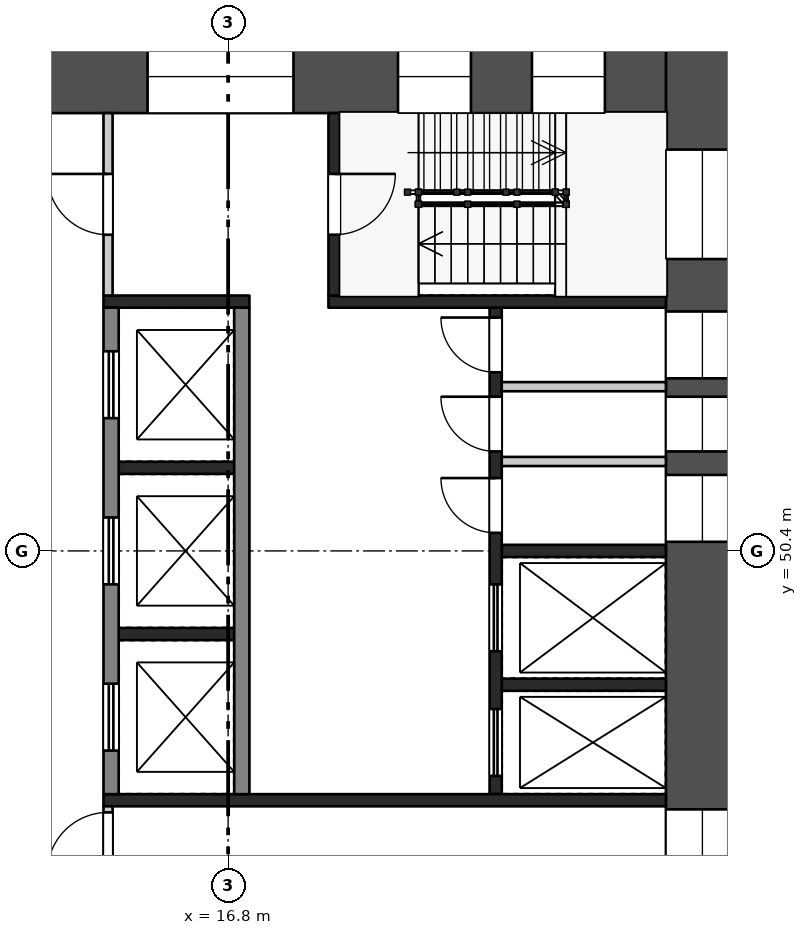
"""IFC4 building model, lengths in metres.
Left out: names, types, materials, properties, quantities, classifications, styles, units other than length and angle.
Written with IfcOpenShell. Run it as: python <this file> out.ifc"""

import sys

from ifc_helpers import new_model, si_unit, direction, frame, frame_2d, origin, place, context, subcontext, project, spatial, rectangle, extrude, element, fill, save


model = new_model("IFC4")
c1 = context("Model", 3, precision=1e-05, world=origin(), true_north=direction((0.0, 1.0)))
c2 = subcontext(c1, "Body", "Model", "MODEL_VIEW")
j1 = project(units=[si_unit("LENGTHUNIT", "METRE"), si_unit("PLANEANGLEUNIT", "RADIAN")], contexts=[c1])
p1 = place(None, origin())
s1 = spatial("IfcSite", under=j1, at=p1, CompositionType="ELEMENT")
p2 = place(p1, origin())
s2 = spatial("IfcBuilding", under=s1, at=p2, CompositionType="ELEMENT")
p3 = place(p2, frame((0.0, 0.0, 140.7)))
s3 = spatial("IfcBuildingStorey", under=s2, at=p3, CompositionType="ELEMENT", Elevation=140.7)
p4 = place(p3, frame((24.6, 58.8, 0.0), z_axis=(0.0, 0.0, 1.0), x_axis=(0.0, -1.0, 0.0)))
e1 = element("IfcWall", 1, at=p4, inside=s3, PredefinedType="SHEAR", context=c2, shape_type="SweptSolid", body=[
    extrude(rectangle(XDim=16.8, YDim=1.2, at=frame_2d((8.4, 0.0))), origin(), (0.0, 0.0, 1.0), 6.72),
])
p5 = place(p4, frame((1.8, 0.0, 0.5)))
e2 = element("IfcOpeningElement", 2, at=p5, cuts=e1, PredefinedType="OPENING", context=c2, shape_type="SweptSolid", body=[
    extrude(rectangle(XDim=1.8, YDim=2.4, at=frame_2d((0.9, 1.2))), frame((0.0, 0.61, 0.0), z_axis=(0.0, -1.0, 0.0), x_axis=(1.0, 0.0, 0.0)), (0.0, 0.0, 1.0), 1.22),
])
p6 = place(p4, frame((4.462, 0.0, 1.6)))
e3 = element("IfcOpeningElement", 3, at=p6, cuts=e1, PredefinedType="OPENING", context=c2, shape_type="SweptSolid", body=[
    extrude(rectangle(XDim=1.1, YDim=1.2, at=frame_2d((0.55, 0.6))), frame((0.0, 0.61, 0.0), z_axis=(0.0, -1.0, 0.0), x_axis=(1.0, 0.0, 0.0)), (0.0, 0.0, 1.0), 1.22),
])
p7 = place(p4, frame((5.864, 0.0, 1.6)))
e4 = element("IfcOpeningElement", 4, at=p7, cuts=e1, PredefinedType="OPENING", context=c2, shape_type="SweptSolid", body=[
    extrude(rectangle(XDim=0.9, YDim=1.2, at=frame_2d((0.45, 0.6))), frame((0.0, 0.61, 0.0), z_axis=(0.0, -1.0, 0.0), x_axis=(1.0, 0.0, 0.0)), (0.0, 0.0, 1.0), 1.22),
])
p8 = place(p4, frame((7.15, 0.0, 1.6)))
e5 = element("IfcOpeningElement", 5, at=p8, cuts=e1, PredefinedType="OPENING", context=c2, shape_type="SweptSolid", body=[
    extrude(rectangle(XDim=1.1, YDim=1.2, at=frame_2d((0.55, 0.6))), frame((0.0, 0.61, 0.0), z_axis=(0.0, -1.0, 0.0), x_axis=(1.0, 0.0, 0.0)), (0.0, 0.0, 1.0), 1.22),
])
p9 = place(p4, frame((12.65, 0.0, 0.6)))
e6 = element("IfcOpeningElement", 6, at=p9, cuts=e1, PredefinedType="OPENING", context=c2, shape_type="SweptSolid", body=[
    extrude(rectangle(XDim=1.0, YDim=2.1, at=frame_2d((0.5, 1.05))), frame((0.0, 0.61, 0.0), z_axis=(0.0, -1.0, 0.0), x_axis=(1.0, 0.0, 0.0)), (0.0, 0.0, 1.0), 1.22),
])
p10 = place(p4, frame((14.175, 0.0, 1.6)))
e7 = element("IfcOpeningElement", 7, at=p10, cuts=e1, PredefinedType="OPENING", context=c2, shape_type="SweptSolid", body=[
    extrude(rectangle(XDim=1.2, YDim=1.2, at=frame_2d((0.6, 0.6))), frame((0.0, 0.61, 0.0), z_axis=(0.0, -1.0, 0.0), x_axis=(1.0, 0.0, 0.0)), (0.0, 0.0, 1.0), 1.22),
])
p11 = place(p3, frame((9.6, 58.2, 0.0), z_axis=(0.0, 0.0, 1.0), x_axis=(1.0, 0.0, 0.0)))
e8 = element("IfcWall", 8, at=p11, inside=s3, PredefinedType="SHEAR", context=c2, shape_type="SweptSolid", body=[
    extrude(rectangle(XDim=14.4, YDim=1.2, at=frame_2d((7.2, 0.0))), origin(), (0.0, 0.0, 1.0), 6.72),
])
p12 = place(p11, frame((1.105, 0.0, 0.6)))
e9 = element("IfcOpeningElement", 9, at=p12, cuts=e8, PredefinedType="OPENING", context=c2, shape_type="SweptSolid", body=[
    extrude(rectangle(XDim=3.0, YDim=2.1, at=frame_2d((1.5, 1.05))), frame((0.0, 0.61, 0.0), z_axis=(0.0, -1.0, 0.0), x_axis=(1.0, 0.0, 0.0)), (0.0, 0.0, 1.0), 1.22),
])
p13 = place(p11, frame((5.875, 0.0, 0.6)))
e10 = element("IfcOpeningElement", 10, at=p13, cuts=e8, PredefinedType="OPENING", context=c2, shape_type="SweptSolid", body=[
    extrude(rectangle(XDim=2.4, YDim=2.1, at=frame_2d((1.2, 1.05))), frame((0.0, 0.61, 0.0), z_axis=(0.0, -1.0, 0.0), x_axis=(1.0, 0.0, 0.0)), (0.0, 0.0, 1.0), 1.22),
])
p14 = place(p11, frame((9.993, 0.0, 0.5)))
e11 = element("IfcOpeningElement", 11, at=p14, cuts=e8, PredefinedType="OPENING", context=c2, shape_type="SweptSolid", body=[
    extrude(rectangle(XDim=1.2, YDim=2.4, at=frame_2d((0.6, 1.2))), frame((0.0, 0.61, 0.0), z_axis=(0.0, -1.0, 0.0), x_axis=(1.0, 0.0, 0.0)), (0.0, 0.0, 1.0), 1.22),
])
p15 = place(p11, frame((12.197, 0.0, 0.5)))
e12 = element("IfcOpeningElement", 12, at=p15, cuts=e8, PredefinedType="OPENING", context=c2, shape_type="SweptSolid", body=[
    extrude(rectangle(XDim=1.2, YDim=2.4, at=frame_2d((0.6, 1.2))), frame((0.0, 0.61, 0.0), z_axis=(0.0, -1.0, 0.0), x_axis=(1.0, 0.0, 0.0)), (0.0, 0.0, 1.0), 1.22),
])
for number, where, z_axis, x_axis in (
    (13, (15.0, 51.767, 0.0), (0.0, 0.0, 1.0), (1.0, 0.0, 0.0)),
    (14, (15.0, 49.033, 0.0), (0.0, 0.0, 1.0), (1.0, 0.0, 0.0)),
):
    element("IfcWall", number, at=place(p3, frame(where, z_axis=z_axis, x_axis=x_axis)), inside=s3, PredefinedType="SHEAR", context=c2, shape_type="SweptSolid", body=[
        extrude(rectangle(XDim=1.9, YDim=0.2, at=frame_2d((0.95, 0.0))), origin(), (0.0, 0.0, 1.0), 6.72),
    ])
p16 = place(p3, frame((14.875, 54.4, 0.0), z_axis=(0.0, 0.0, 1.0), x_axis=(0.0, -1.0, 0.0)))
e15 = element("IfcWall", 15, at=p16, inside=s3, PredefinedType="SHEAR", context=c2, shape_type="SweptSolid", body=[
    extrude(rectangle(XDim=8.0, YDim=0.25, at=frame_2d((4.0, 0.0))), origin(), (0.0, 0.0, 1.0), 6.72),
])
p17 = place(p16, frame((0.717, 0.0, 0.0)))
e16 = element("IfcOpeningElement", 16, at=p17, cuts=e15, PredefinedType="OPENING", context=c2, shape_type="SweptSolid", body=[
    extrude(rectangle(XDim=1.1, YDim=2.1, at=frame_2d((0.55, 1.05))), frame((0.0, 0.135, 0.0), z_axis=(0.0, -1.0, 0.0), x_axis=(1.0, 0.0, 0.0)), (0.0, 0.0, 1.0), 0.27),
])
p18 = place(p16, frame((3.45, 0.0, 0.0)))
e17 = element("IfcOpeningElement", 17, at=p18, cuts=e15, PredefinedType="OPENING", context=c2, shape_type="SweptSolid", body=[
    extrude(rectangle(XDim=1.1, YDim=2.1, at=frame_2d((0.55, 1.05))), frame((0.0, 0.135, 0.0), z_axis=(0.0, -1.0, 0.0), x_axis=(1.0, 0.0, 0.0)), (0.0, 0.0, 1.0), 0.27),
])
p19 = place(p16, frame((6.183, 0.0, 0.0)))
e18 = element("IfcOpeningElement", 18, at=p19, cuts=e15, PredefinedType="OPENING", context=c2, shape_type="SweptSolid", body=[
    extrude(rectangle(XDim=1.1, YDim=2.1, at=frame_2d((0.55, 1.05))), frame((0.0, 0.135, 0.0), z_axis=(0.0, -1.0, 0.0), x_axis=(1.0, 0.0, 0.0)), (0.0, 0.0, 1.0), 0.27),
])
p20 = place(p3, frame((17.025, 54.4, 0.0), z_axis=(0.0, 0.0, 1.0), x_axis=(0.0, -1.0, 0.0)))
e19 = element("IfcWall", 19, at=p20, inside=s3, PredefinedType="SHEAR", context=c2, shape_type="SweptSolid", body=[
    extrude(rectangle(XDim=8.0, YDim=0.25, at=frame_2d((4.0, 0.0))), origin(), (0.0, 0.0, 1.0), 6.72),
])
for number, where, z_axis, x_axis in (
    (20, (21.3, 50.4, 0.0), (0.0, 0.0, 1.0), (1.0, 0.0, 0.0)),
    (21, (21.3, 48.2, 0.0), (0.0, 0.0, 1.0), (1.0, 0.0, 0.0)),
):
    element("IfcWall", number, at=place(p3, frame(where, z_axis=z_axis, x_axis=x_axis)), inside=s3, PredefinedType="SHEAR", context=c2, shape_type="SweptSolid", body=[
        extrude(rectangle(XDim=2.7, YDim=0.2, at=frame_2d((1.35, 0.0))), origin(), (0.0, 0.0, 1.0), 6.72),
    ])
for number, where, z_axis, x_axis in (
    (22, (21.3, 53.101, 0.0), (0.0, 0.0, 1.0), (1.0, 0.0, 0.0)),
    (23, (21.3, 51.871, 0.0), (0.0, 0.0, 1.0), (1.0, 0.0, 0.0)),
):
    element("IfcWall", number, at=place(p3, frame(where, z_axis=z_axis, x_axis=x_axis)), inside=s3, PredefinedType="PARTITIONING", context=c2, shape_type="SweptSolid", body=[
        extrude(rectangle(XDim=2.7, YDim=0.15, at=frame_2d((1.35, 0.0))), origin(), (0.0, 0.0, 1.0), 6.72),
    ])
p21 = place(p3, frame((21.2, 54.4, 0.0), z_axis=(0.0, 0.0, 1.0), x_axis=(0.0, -1.0, 0.0)))
e24 = element("IfcWall", 24, at=p21, inside=s3, PredefinedType="SHEAR", context=c2, shape_type="SweptSolid", body=[
    extrude(rectangle(XDim=8.0, YDim=0.2, at=frame_2d((4.0, 0.0))), origin(), (0.0, 0.0, 1.0), 6.72),
])
p22 = place(p21, frame((0.162, 0.0, 0.0)))
e25 = element("IfcOpeningElement", 25, at=p22, cuts=e24, PredefinedType="OPENING", context=c2, shape_type="SweptSolid", body=[
    extrude(rectangle(XDim=0.9, YDim=2.1, at=frame_2d((0.45, 1.05))), frame((0.0, 0.11, 0.0), z_axis=(0.0, -1.0, 0.0), x_axis=(1.0, 0.0, 0.0)), (0.0, 0.0, 1.0), 0.22),
])
p23 = place(p21, frame((1.464, 0.0, 0.0)))
e26 = element("IfcOpeningElement", 26, at=p23, cuts=e24, PredefinedType="OPENING", context=c2, shape_type="SweptSolid", body=[
    extrude(rectangle(XDim=0.9, YDim=2.1, at=frame_2d((0.45, 1.05))), frame((0.0, 0.11, 0.0), z_axis=(0.0, -1.0, 0.0), x_axis=(1.0, 0.0, 0.0)), (0.0, 0.0, 1.0), 0.22),
])
p24 = place(p21, frame((2.802, 0.0, 0.0)))
e27 = element("IfcOpeningElement", 27, at=p24, cuts=e24, PredefinedType="OPENING", context=c2, shape_type="SweptSolid", body=[
    extrude(rectangle(XDim=0.9, YDim=2.1, at=frame_2d((0.45, 1.05))), frame((0.0, 0.11, 0.0), z_axis=(0.0, -1.0, 0.0), x_axis=(1.0, 0.0, 0.0)), (0.0, 0.0, 1.0), 0.22),
])
p25 = place(p21, frame((4.55, 0.0, 0.0)))
e28 = element("IfcOpeningElement", 28, at=p25, cuts=e24, PredefinedType="OPENING", context=c2, shape_type="SweptSolid", body=[
    extrude(rectangle(XDim=1.1, YDim=2.1, at=frame_2d((0.55, 1.05))), frame((0.0, 0.11, 0.0), z_axis=(0.0, -1.0, 0.0), x_axis=(1.0, 0.0, 0.0)), (0.0, 0.0, 1.0), 0.22),
])
p26 = place(p21, frame((6.6, 0.0, 0.0)))
e29 = element("IfcOpeningElement", 29, at=p26, cuts=e24, PredefinedType="OPENING", context=c2, shape_type="SweptSolid", body=[
    extrude(rectangle(XDim=1.1, YDim=2.1, at=frame_2d((0.55, 1.05))), frame((0.0, 0.11, 0.0), z_axis=(0.0, -1.0, 0.0), x_axis=(1.0, 0.0, 0.0)), (0.0, 0.0, 1.0), 0.22),
])
p27 = place(p3, frame((14.75, 54.5, 0.0), z_axis=(0.0, 0.0, 1.0), x_axis=(1.0, 0.0, 0.0)))
e30 = element("IfcWall", 30, at=p27, inside=s3, PredefinedType="SHEAR", context=c2, shape_type="SweptSolid", body=[
    extrude(rectangle(XDim=2.4, YDim=0.2, at=frame_2d((1.2, 0.0))), origin(), (0.0, 0.0, 1.0), 6.72),
])
p28 = place(p3, frame((18.45, 54.5, 0.0), z_axis=(0.0, 0.0, 1.0), x_axis=(1.0, 0.0, 0.0)))
e31 = element("IfcWall", 31, at=p28, inside=s3, PredefinedType="SHEAR", context=c2, shape_type="SweptSolid", body=[
    extrude(rectangle(XDim=5.55, YDim=0.2, at=frame_2d((2.775, 0.0))), origin(), (0.0, 0.0, 1.0), 6.72),
])
p29 = place(p3, frame((14.825, 57.6, 0.0), z_axis=(0.0, 0.0, 1.0), x_axis=(0.0, -1.0, 0.0)))
e32 = element("IfcWall", 32, at=p29, inside=s3, PredefinedType="PARTITIONING", context=c2, shape_type="SweptSolid", body=[
    extrude(rectangle(XDim=3.0, YDim=0.15, at=frame_2d((1.5, 0.0))), origin(), (0.0, 0.0, 1.0), 6.72),
])
p30 = place(p29, frame((1.0, 0.0, 0.0)))
e33 = element("IfcOpeningElement", 33, at=p30, cuts=e32, PredefinedType="OPENING", context=c2, shape_type="SweptSolid", body=[
    extrude(rectangle(XDim=1.0, YDim=2.1, at=frame_2d((0.5, 1.05))), frame((0.0, 0.085, 0.0), z_axis=(0.0, -1.0, 0.0), x_axis=(1.0, 0.0, 0.0)), (0.0, 0.0, 1.0), 0.17),
])
p31 = place(p3, frame((18.55, 57.6, 0.0), z_axis=(0.0, 0.0, 1.0), x_axis=(0.0, -1.0, 0.0)))
e34 = element("IfcWall", 34, at=p31, inside=s3, PredefinedType="SHEAR", context=c2, shape_type="SweptSolid", body=[
    extrude(rectangle(XDim=3.0, YDim=0.2, at=frame_2d((1.5, 0.0))), origin(), (0.0, 0.0, 1.0), 6.72),
])
p32 = place(p31, frame((1.0, 0.0, 0.0)))
e35 = element("IfcOpeningElement", 35, at=p32, cuts=e34, PredefinedType="OPENING", context=c2, shape_type="SweptSolid", body=[
    extrude(rectangle(XDim=1.0, YDim=2.1, at=frame_2d((0.5, 1.05))), frame((0.0, 0.11, 0.0), z_axis=(0.0, -1.0, 0.0), x_axis=(1.0, 0.0, 0.0)), (0.0, 0.0, 1.0), 0.22),
])
p33 = place(p3, frame((14.75, 46.3, 0.0), z_axis=(0.0, 0.0, 1.0), x_axis=(1.0, 0.0, 0.0)))
e36 = element("IfcWall", 36, at=p33, inside=s3, PredefinedType="SHEAR", context=c2, shape_type="SweptSolid", body=[
    extrude(rectangle(XDim=9.25, YDim=0.2, at=frame_2d((4.625, 0.0))), origin(), (0.0, 0.0, 1.0), 6.72),
])
p34 = place(p3, frame((14.825, 46.2, 0.0), z_axis=(0.0, 0.0, 1.0), x_axis=(0.0, -1.0, 0.0)))
e37 = element("IfcWall", 37, at=p34, inside=s3, PredefinedType="PARTITIONING", context=c2, shape_type="SweptSolid", body=[
    extrude(rectangle(XDim=3.0, YDim=0.15, at=frame_2d((1.5, 0.0))), origin(), (0.0, 0.0, 1.0), 6.72),
])
p35 = place(p34, frame((0.1, 0.0, 0.0)))
e38 = element("IfcOpeningElement", 38, at=p35, cuts=e37, PredefinedType="OPENING", context=c2, shape_type="SweptSolid", body=[
    extrude(rectangle(XDim=1.0, YDim=2.1, at=frame_2d((0.5, 1.05))), frame((0.0, 0.085, 0.0), z_axis=(0.0, -1.0, 0.0), x_axis=(1.0, 0.0, 0.0)), (0.0, 0.0, 1.0), 0.17),
])
p36 = place(p17, origin())
e39 = element("IfcDoor", 39, at=p36, inside=s3, OperationType="DOUBLE_DOOR_SLIDING", PredefinedType="DOOR", context=c2, shape_type="SweptSolid", body=[
    extrude(rectangle(XDim=1.1, YDim=2.1, at=frame_2d((0.55, 1.05))), frame((0.0, 0.025, 0.0), z_axis=(0.0, -1.0, 0.0), x_axis=(1.0, 0.0, 0.0)), (0.0, 0.0, 1.0), 0.05),
])
fill(e16, e39)
p37 = place(p18, origin())
e40 = element("IfcDoor", 40, at=p37, inside=s3, OperationType="DOUBLE_DOOR_SLIDING", PredefinedType="DOOR", context=c2, shape_type="SweptSolid", body=[
    extrude(rectangle(XDim=1.1, YDim=2.1, at=frame_2d((0.55, 1.05))), frame((0.0, 0.025, 0.0), z_axis=(0.0, -1.0, 0.0), x_axis=(1.0, 0.0, 0.0)), (0.0, 0.0, 1.0), 0.05),
])
fill(e17, e40)
p38 = place(p19, origin())
e41 = element("IfcDoor", 41, at=p38, inside=s3, OperationType="DOUBLE_DOOR_SLIDING", PredefinedType="DOOR", context=c2, shape_type="SweptSolid", body=[
    extrude(rectangle(XDim=1.1, YDim=2.1, at=frame_2d((0.55, 1.05))), frame((0.0, 0.025, 0.0), z_axis=(0.0, -1.0, 0.0), x_axis=(1.0, 0.0, 0.0)), (0.0, 0.0, 1.0), 0.05),
])
fill(e18, e41)
p39 = place(p22, frame((0.9, 0.0, 0.0), z_axis=(0.0, 0.0, 1.0), x_axis=(-1.0, 0.0, 0.0)))
e42 = element("IfcDoor", 42, at=p39, inside=s3, OperationType="SINGLE_SWING_RIGHT", PredefinedType="DOOR", context=c2, shape_type="SweptSolid", body=[
    extrude(rectangle(XDim=0.9, YDim=2.1, at=frame_2d((0.45, 1.05))), frame((0.0, 0.025, 0.0), z_axis=(0.0, -1.0, 0.0), x_axis=(1.0, 0.0, 0.0)), (0.0, 0.0, 1.0), 0.05),
])
fill(e25, e42)
p40 = place(p23, frame((0.9, 0.0, 0.0), z_axis=(0.0, 0.0, 1.0), x_axis=(-1.0, 0.0, 0.0)))
e43 = element("IfcDoor", 43, at=p40, inside=s3, OperationType="SINGLE_SWING_RIGHT", PredefinedType="DOOR", context=c2, shape_type="SweptSolid", body=[
    extrude(rectangle(XDim=0.9, YDim=2.1, at=frame_2d((0.45, 1.05))), frame((0.0, 0.025, 0.0), z_axis=(0.0, -1.0, 0.0), x_axis=(1.0, 0.0, 0.0)), (0.0, 0.0, 1.0), 0.05),
])
fill(e26, e43)
p41 = place(p24, frame((0.9, 0.0, 0.0), z_axis=(0.0, 0.0, 1.0), x_axis=(-1.0, 0.0, 0.0)))
e44 = element("IfcDoor", 44, at=p41, inside=s3, OperationType="SINGLE_SWING_RIGHT", PredefinedType="DOOR", context=c2, shape_type="SweptSolid", body=[
    extrude(rectangle(XDim=0.9, YDim=2.1, at=frame_2d((0.45, 1.05))), frame((0.0, 0.025, 0.0), z_axis=(0.0, -1.0, 0.0), x_axis=(1.0, 0.0, 0.0)), (0.0, 0.0, 1.0), 0.05),
])
fill(e27, e44)
p42 = place(p25, origin())
e45 = element("IfcDoor", 45, at=p42, inside=s3, OperationType="DOUBLE_DOOR_SLIDING", PredefinedType="DOOR", context=c2, shape_type="SweptSolid", body=[
    extrude(rectangle(XDim=1.1, YDim=2.1, at=frame_2d((0.55, 1.05))), frame((0.0, 0.025, 0.0), z_axis=(0.0, -1.0, 0.0), x_axis=(1.0, 0.0, 0.0)), (0.0, 0.0, 1.0), 0.05),
])
fill(e28, e45)
p43 = place(p26, origin())
e46 = element("IfcDoor", 46, at=p43, inside=s3, OperationType="DOUBLE_DOOR_SLIDING", PredefinedType="DOOR", context=c2, shape_type="SweptSolid", body=[
    extrude(rectangle(XDim=1.1, YDim=2.1, at=frame_2d((0.55, 1.05))), frame((0.0, 0.025, 0.0), z_axis=(0.0, -1.0, 0.0), x_axis=(1.0, 0.0, 0.0)), (0.0, 0.0, 1.0), 0.05),
])
fill(e29, e46)
p44 = place(p30, frame((1.0, 0.0, 0.0), z_axis=(0.0, 0.0, 1.0), x_axis=(-1.0, 0.0, 0.0)))
e47 = element("IfcDoor", 47, at=p44, inside=s3, OperationType="SINGLE_SWING_RIGHT", PredefinedType="DOOR", context=c2, shape_type="SweptSolid", body=[
    extrude(rectangle(XDim=1.0, YDim=2.1, at=frame_2d((0.5, 1.05))), frame((0.0, 0.025, 0.0), z_axis=(0.0, -1.0, 0.0), x_axis=(1.0, 0.0, 0.0)), (0.0, 0.0, 1.0), 0.05),
])
fill(e33, e47)
p45 = place(p32, origin())
e48 = element("IfcDoor", 48, at=p45, inside=s3, OperationType="SINGLE_SWING_LEFT", PredefinedType="DOOR", context=c2, shape_type="SweptSolid", body=[
    extrude(rectangle(XDim=1.0, YDim=2.1, at=frame_2d((0.5, 1.05))), frame((0.0, 0.025, 0.0), z_axis=(0.0, -1.0, 0.0), x_axis=(1.0, 0.0, 0.0)), (0.0, 0.0, 1.0), 0.05),
])
fill(e35, e48)
p46 = place(p35, frame((1.0, 0.0, 0.0), z_axis=(0.0, 0.0, 1.0), x_axis=(-1.0, 0.0, 0.0)))
e49 = element("IfcDoor", 49, at=p46, inside=s3, OperationType="SINGLE_SWING_LEFT", PredefinedType="DOOR", context=c2, shape_type="SweptSolid", body=[
    extrude(rectangle(XDim=1.0, YDim=2.1, at=frame_2d((0.5, 1.05))), frame((0.0, 0.025, 0.0), z_axis=(0.0, -1.0, 0.0), x_axis=(1.0, 0.0, 0.0)), (0.0, 0.0, 1.0), 0.05),
])
fill(e38, e49)
p47 = place(p5, origin())
e50 = element("IfcWindow", 50, at=p47, inside=s3, PartitioningType="SINGLE_PANEL", PredefinedType="WINDOW", context=c2, shape_type="SweptSolid", body=[
    extrude(rectangle(XDim=1.8, YDim=2.4, at=frame_2d((0.9, 1.2))), frame((0.0, 0.03, 0.0), z_axis=(0.0, -1.0, 0.0), x_axis=(1.0, 0.0, 0.0)), (0.0, 0.0, 1.0), 0.06),
])
fill(e2, e50)
p48 = place(p6, origin())
e51 = element("IfcWindow", 51, at=p48, inside=s3, PartitioningType="SINGLE_PANEL", PredefinedType="WINDOW", context=c2, shape_type="SweptSolid", body=[
    extrude(rectangle(XDim=1.1, YDim=1.2, at=frame_2d((0.55, 0.6))), frame((0.0, 0.03, 0.0), z_axis=(0.0, -1.0, 0.0), x_axis=(1.0, 0.0, 0.0)), (0.0, 0.0, 1.0), 0.06),
])
fill(e3, e51)
p49 = place(p7, origin())
e52 = element("IfcWindow", 52, at=p49, inside=s3, PartitioningType="SINGLE_PANEL", PredefinedType="WINDOW", context=c2, shape_type="SweptSolid", body=[
    extrude(rectangle(XDim=0.9, YDim=1.2, at=frame_2d((0.45, 0.6))), frame((0.0, 0.03, 0.0), z_axis=(0.0, -1.0, 0.0), x_axis=(1.0, 0.0, 0.0)), (0.0, 0.0, 1.0), 0.06),
])
fill(e4, e52)
p50 = place(p8, origin())
e53 = element("IfcWindow", 53, at=p50, inside=s3, PartitioningType="SINGLE_PANEL", PredefinedType="WINDOW", context=c2, shape_type="SweptSolid", body=[
    extrude(rectangle(XDim=1.1, YDim=1.2, at=frame_2d((0.55, 0.6))), frame((0.0, 0.03, 0.0), z_axis=(0.0, -1.0, 0.0), x_axis=(1.0, 0.0, 0.0)), (0.0, 0.0, 1.0), 0.06),
])
fill(e5, e53)
p51 = place(p9, origin())
e54 = element("IfcWindow", 54, at=p51, inside=s3, PartitioningType="SINGLE_PANEL", PredefinedType="WINDOW", context=c2, shape_type="SweptSolid", body=[
    extrude(rectangle(XDim=1.0, YDim=2.1, at=frame_2d((0.5, 1.05))), frame((0.0, 0.03, 0.0), z_axis=(0.0, -1.0, 0.0), x_axis=(1.0, 0.0, 0.0)), (0.0, 0.0, 1.0), 0.06),
])
fill(e6, e54)
p52 = place(p13, origin())
e55 = element("IfcWindow", 55, at=p52, inside=s3, PartitioningType="SINGLE_PANEL", PredefinedType="WINDOW", context=c2, shape_type="SweptSolid", body=[
    extrude(rectangle(XDim=2.4, YDim=2.1, at=frame_2d((1.2, 1.05))), frame((0.0, 0.03, 0.0), z_axis=(0.0, -1.0, 0.0), x_axis=(1.0, 0.0, 0.0)), (0.0, 0.0, 1.0), 0.06),
])
fill(e10, e55)
p53 = place(p14, origin())
e56 = element("IfcWindow", 56, at=p53, inside=s3, PartitioningType="SINGLE_PANEL", PredefinedType="WINDOW", context=c2, shape_type="SweptSolid", body=[
    extrude(rectangle(XDim=1.2, YDim=2.4, at=frame_2d((0.6, 1.2))), frame((0.0, 0.03, 0.0), z_axis=(0.0, -1.0, 0.0), x_axis=(1.0, 0.0, 0.0)), (0.0, 0.0, 1.0), 0.06),
])
fill(e11, e56)
p54 = place(p15, origin())
e57 = element("IfcWindow", 57, at=p54, inside=s3, PartitioningType="SINGLE_PANEL", PredefinedType="WINDOW", context=c2, shape_type="SweptSolid", body=[
    extrude(rectangle(XDim=1.2, YDim=2.4, at=frame_2d((0.6, 1.2))), frame((0.0, 0.03, 0.0), z_axis=(0.0, -1.0, 0.0), x_axis=(1.0, 0.0, 0.0)), (0.0, 0.0, 1.0), 0.06),
])
fill(e12, e57)
save(model, sys.argv[1])
